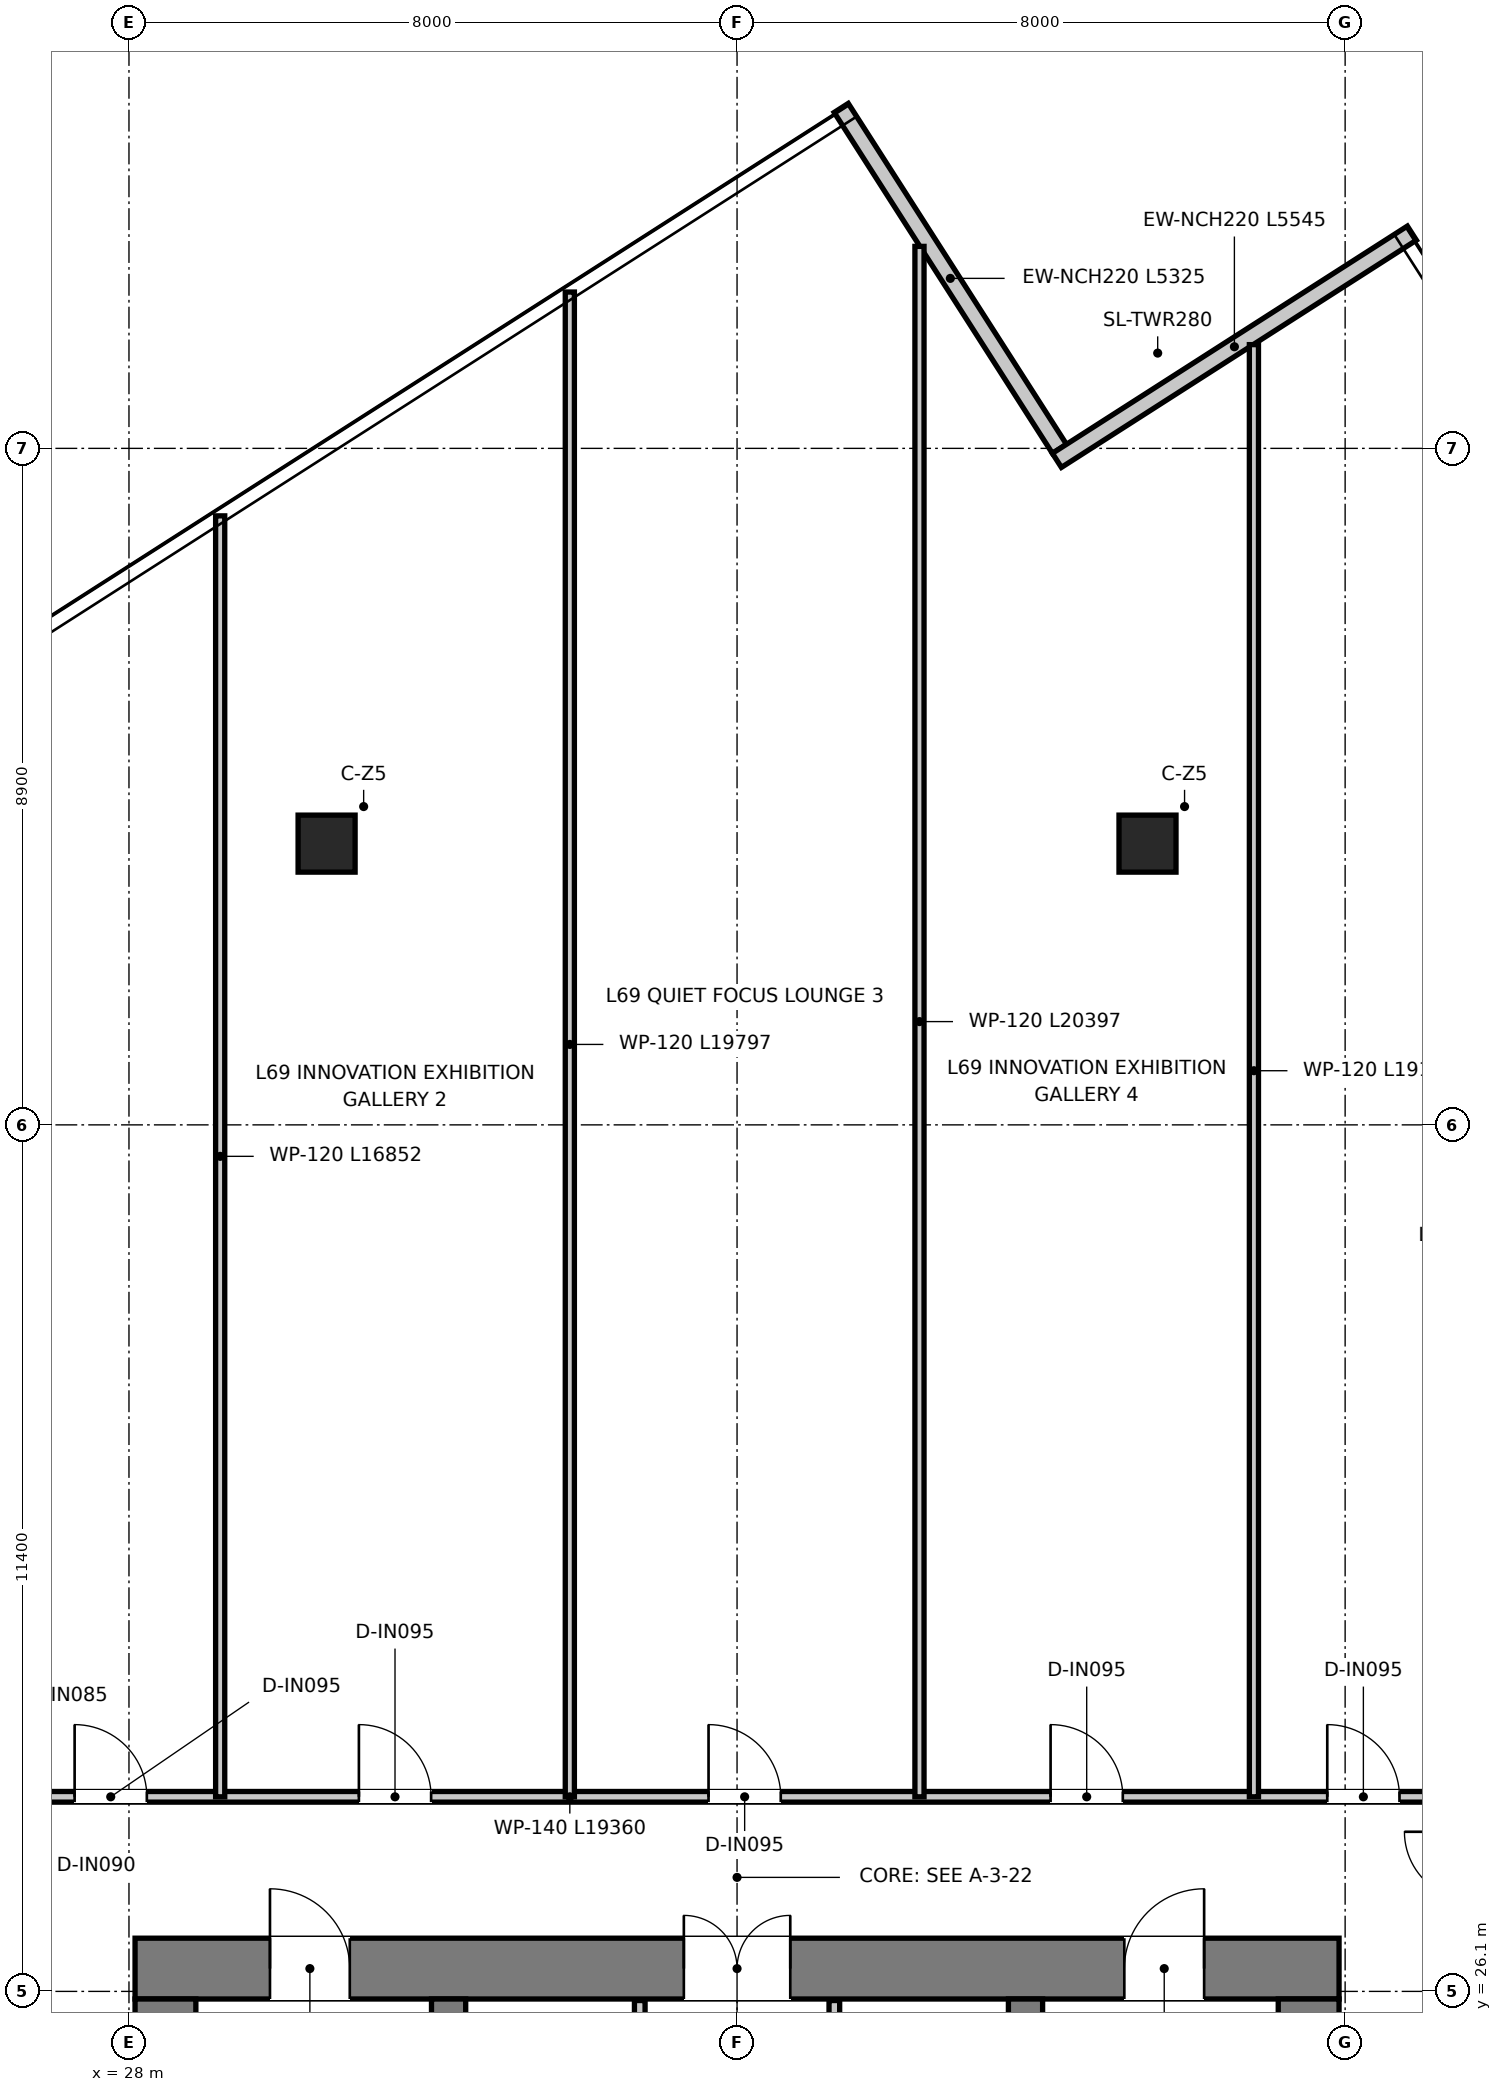
"""IFC4 building model, lengths in metres.
Left out: names, types, materials, properties, quantities, classifications, styles, units other than length and angle.
Written with IfcOpenShell. Run it as: python <this file> out.ifc"""

import sys

from ifc_helpers import new_model, si_unit, direction, frame, frame_2d, origin, origin_2d, place, context, subcontext, project, spatial, rectangle, extrude, source, transform, mapped, element, fill, save


model = new_model("IFC4")
c1 = context("Model", 3, precision=1e-05, world=origin(), true_north=direction((0.0, 1.0)))
c2 = subcontext(c1, "Body", "Model", "MODEL_VIEW")
j1 = project(units=[si_unit("LENGTHUNIT", "METRE"), si_unit("PLANEANGLEUNIT", "RADIAN")], contexts=[c1])
p1 = place(None, origin())
s1 = spatial("IfcSite", under=j1, at=p1, CompositionType="ELEMENT")
p2 = place(p1, origin())
s2 = spatial("IfcBuilding", under=s1, at=p2, CompositionType="ELEMENT")
p3 = place(p2, frame((0.0, 0.0, 283.2)))
s3 = spatial("IfcBuildingStorey", under=s2, at=p3, CompositionType="ELEMENT", Elevation=283.2)
p4 = place(p3, frame((28.08, 26.4, 0.0), z_axis=(0.0, 0.0, 1.0), x_axis=(1.0, 0.0, 0.0)))
e1 = element("IfcWall", 1, at=p4, inside=s3, PredefinedType="SHEAR", context=c2, shape_type="SweptSolid", body=[
    extrude(rectangle(XDim=15.84, YDim=0.8, at=frame_2d((7.92, 0.0))), origin(), (0.0, 0.0, 1.0), 3.95),
])
p5 = place(p4, frame((7.22, 0.0, 0.0)))
e2 = element("IfcOpeningElement", 2, at=p5, cuts=e1, PredefinedType="OPENING", context=c2, shape_type="SweptSolid", body=[
    extrude(rectangle(XDim=1.4, YDim=2.2, at=frame_2d((0.7, 1.1))), frame((0.0, 0.41, 0.0), z_axis=(0.0, -1.0, 0.0), x_axis=(1.0, 0.0, 0.0)), (0.0, 0.0, 1.0), 0.82),
])
p6 = place(p4, frame((1.775, 0.0, 0.0)))
e3 = element("IfcOpeningElement", 3, at=p6, cuts=e1, PredefinedType="OPENING", context=c2, shape_type="SweptSolid", body=[
    extrude(rectangle(XDim=1.05, YDim=2.1, at=frame_2d((0.525, 1.05))), frame((0.0, 0.41, 0.0), z_axis=(0.0, -1.0, 0.0), x_axis=(1.0, 0.0, 0.0)), (0.0, 0.0, 1.0), 0.82),
])
p7 = place(p4, frame((13.015, 0.0, 0.0)))
e4 = element("IfcOpeningElement", 4, at=p7, cuts=e1, PredefinedType="OPENING", context=c2, shape_type="SweptSolid", body=[
    extrude(rectangle(XDim=1.05, YDim=2.1, at=frame_2d((0.525, 1.05))), frame((0.0, 0.41, 0.0), z_axis=(0.0, -1.0, 0.0), x_axis=(1.0, 0.0, 0.0)), (0.0, 0.0, 1.0), 0.82),
])
for number, where, z_axis, x_axis in (
    (5, (28.48, 11.3, 0.0), (0.0, 0.0, 1.0), (0.0, 1.0, 0.0)),
    (6, (43.52, 11.3, 0.0), (0.0, 0.0, 1.0), (0.0, 1.0, 0.0)),
):
    element("IfcWall", number, at=place(p3, frame(where, z_axis=z_axis, x_axis=x_axis)), inside=s3, PredefinedType="SHEAR", context=c2, shape_type="SweptSolid", body=[
        extrude(rectangle(XDim=14.7, YDim=0.8, at=frame_2d((7.35, 0.0))), origin(), (0.0, 0.0, 1.0), 3.95),
    ])
p8 = place(p3, frame((32.205, 13.22, 0.0), z_axis=(0.0, 0.0, 1.0), x_axis=(0.0, 1.0, 0.0)))
e7 = element("IfcWall", 7, at=p8, inside=s3, PredefinedType="SHEAR", context=c2, shape_type="SweptSolid", body=[
    extrude(rectangle(XDim=12.78, YDim=0.45, at=frame_2d((6.39, 0.0))), origin(), (0.0, 0.0, 1.0), 3.95),
])
p9 = place(p8, frame((10.58, 0.0, 0.0)))
e8 = element("IfcOpeningElement", 8, at=p9, cuts=e7, PredefinedType="OPENING", context=c2, shape_type="SweptSolid", body=[
    extrude(rectangle(XDim=1.1, YDim=2.15, at=frame_2d((0.55, 1.075))), frame((0.0, 0.235, 0.0), z_axis=(0.0, -1.0, 0.0), x_axis=(1.0, 0.0, 0.0)), (0.0, 0.0, 1.0), 0.47),
])
p10 = place(p3, frame((39.795, 13.22, 0.0), z_axis=(0.0, 0.0, 1.0), x_axis=(0.0, 1.0, 0.0)))
e9 = element("IfcWall", 9, at=p10, inside=s3, PredefinedType="SHEAR", context=c2, shape_type="SweptSolid", body=[
    extrude(rectangle(XDim=12.78, YDim=0.45, at=frame_2d((6.39, 0.0))), origin(), (0.0, 0.0, 1.0), 3.95),
])
p11 = place(p10, frame((10.58, 0.0, 0.0)))
e10 = element("IfcOpeningElement", 10, at=p11, cuts=e9, PredefinedType="OPENING", context=c2, shape_type="SweptSolid", body=[
    extrude(rectangle(XDim=1.1, YDim=2.15, at=frame_2d((0.55, 1.075))), frame((0.0, 0.235, 0.0), z_axis=(0.0, -1.0, 0.0), x_axis=(1.0, 0.0, 0.0)), (0.0, 0.0, 1.0), 0.47),
])
m1 = source(origin(), c2, "Body", "SweptSolid", [
    extrude(rectangle(XDim=0.75, YDim=0.75, at=origin_2d()), origin(), (0.0, 0.0, 1.0), 3.95),
])
for number, where, z_axis, x_axis in (
    (11, (30.6, 41.2, 0.0), (0.0, 0.0, 1.0), (1.0, 0.0, 0.0)),
    (12, (41.4, 41.2, 0.0), (0.0, 0.0, 1.0), (1.0, 0.0, 0.0)),
):
    element("IfcColumn", number, at=place(p3, frame(where, z_axis=z_axis, x_axis=x_axis)), inside=s3, PredefinedType="COLUMN", context=c2, shape_type="MappedRepresentation", body=[
        mapped(m1, transform((0.0, 0.0, 0.0), x_axis=(1.0, 0.0, 0.0), y_axis=(0.0, 1.0, 0.0), z_axis=(0.0, 0.0, 1.0), scale=1.0)),
    ])
p12 = place(p3, frame((40.241, 46.394, 0.0), z_axis=(0.0, 0.0, 1.0), x_axis=(-0.539157771194, 0.842204783744, 0.0)))
e13 = element("IfcWall", 13, at=p12, inside=s3, PredefinedType="ELEMENTEDWALL", context=c2, shape_type="SweptSolid", body=[
    extrude(rectangle(XDim=5.325, YDim=0.22, at=frame_2d((2.663, 0.0))), origin(), (0.0, 0.0, 1.0), 3.67),
])
p13 = place(p3, frame((44.878, 49.232, 0.0), z_axis=(0.0, 0.0, 1.0), x_axis=(-0.842222620948, -0.539129907131, 0.0)))
e14 = element("IfcWall", 14, at=p13, inside=s3, PredefinedType="ELEMENTEDWALL", context=c2, shape_type="SweptSolid", body=[
    extrude(rectangle(XDim=5.545, YDim=0.22, at=frame_2d((2.772, 0.0))), origin(), (0.0, 0.0, 1.0), 3.67),
])
p14 = place(p3, frame((34.72, 20.2, 0.0), z_axis=(0.0, 0.0, 1.0), x_axis=(0.0, 1.0, 0.0)))
e15 = element("IfcWall", 15, at=p14, inside=s3, PredefinedType="PARTITIONING", context=c2, shape_type="SweptSolid", body=[
    extrude(rectangle(XDim=5.78, YDim=0.14, at=frame_2d((2.89, 0.0))), origin(), (0.0, 0.0, 1.0), 2.82),
])
p15 = place(p14, frame((1.05, 0.0, 0.0)))
e16 = element("IfcOpeningElement", 16, at=p15, cuts=e15, PredefinedType="OPENING", context=c2, shape_type="SweptSolid", body=[
    extrude(rectangle(XDim=0.9, YDim=2.1, at=frame_2d((0.45, 1.05))), frame((0.0, 0.08, 0.0), z_axis=(0.0, -1.0, 0.0), x_axis=(1.0, 0.0, 0.0)), (0.0, 0.0, 1.0), 0.16),
])
p16 = place(p3, frame((37.28, 20.2, 0.0), z_axis=(0.0, 0.0, 1.0), x_axis=(0.0, 1.0, 0.0)))
e17 = element("IfcWall", 17, at=p16, inside=s3, PredefinedType="PARTITIONING", context=c2, shape_type="SweptSolid", body=[
    extrude(rectangle(XDim=5.78, YDim=0.14, at=frame_2d((2.89, 0.0))), origin(), (0.0, 0.0, 1.0), 2.82),
])
p17 = place(p16, frame((0.95, 0.0, 0.0)))
e18 = element("IfcOpeningElement", 18, at=p17, cuts=e17, PredefinedType="OPENING", context=c2, shape_type="SweptSolid", body=[
    extrude(rectangle(XDim=1.1, YDim=2.15, at=frame_2d((0.55, 1.075))), frame((0.0, 0.08, 0.0), z_axis=(0.0, -1.0, 0.0), x_axis=(1.0, 0.0, 0.0)), (0.0, 0.0, 1.0), 0.16),
])
p18 = place(p3, frame((26.32, 28.66, 0.0), z_axis=(0.0, 0.0, 1.0), x_axis=(1.0, 0.0, 0.0)))
e19 = element("IfcWall", 19, at=p18, inside=s3, PredefinedType="PARTITIONING", context=c2, shape_type="SweptSolid", body=[
    extrude(rectangle(XDim=19.36, YDim=0.14, at=frame_2d((9.68, 0.0))), origin(), (0.0, 0.0, 1.0), 3.18),
])
p19 = place(p18, frame((0.965, 0.0, 0.0)))
e20 = element("IfcOpeningElement", 20, at=p19, cuts=e19, PredefinedType="OPENING", context=c2, shape_type="SweptSolid", body=[
    extrude(rectangle(XDim=0.95, YDim=2.1, at=frame_2d((0.475, 1.05))), frame((0.0, 0.08, 0.0), z_axis=(0.0, -1.0, 0.0), x_axis=(1.0, 0.0, 0.0)), (0.0, 0.0, 1.0), 0.16),
])
p20 = place(p18, frame((4.705, 0.0, 0.0)))
e21 = element("IfcOpeningElement", 21, at=p20, cuts=e19, PredefinedType="OPENING", context=c2, shape_type="SweptSolid", body=[
    extrude(rectangle(XDim=0.95, YDim=2.1, at=frame_2d((0.475, 1.05))), frame((0.0, 0.08, 0.0), z_axis=(0.0, -1.0, 0.0), x_axis=(1.0, 0.0, 0.0)), (0.0, 0.0, 1.0), 0.16),
])
p21 = place(p18, frame((9.305, 0.0, 0.0)))
e22 = element("IfcOpeningElement", 22, at=p21, cuts=e19, PredefinedType="OPENING", context=c2, shape_type="SweptSolid", body=[
    extrude(rectangle(XDim=0.95, YDim=2.1, at=frame_2d((0.475, 1.05))), frame((0.0, 0.08, 0.0), z_axis=(0.0, -1.0, 0.0), x_axis=(1.0, 0.0, 0.0)), (0.0, 0.0, 1.0), 0.16),
])
p22 = place(p18, frame((13.805, 0.0, 0.0)))
e23 = element("IfcOpeningElement", 23, at=p22, cuts=e19, PredefinedType="OPENING", context=c2, shape_type="SweptSolid", body=[
    extrude(rectangle(XDim=0.95, YDim=2.1, at=frame_2d((0.475, 1.05))), frame((0.0, 0.08, 0.0), z_axis=(0.0, -1.0, 0.0), x_axis=(1.0, 0.0, 0.0)), (0.0, 0.0, 1.0), 0.16),
])
p23 = place(p18, frame((17.445, 0.0, 0.0)))
e24 = element("IfcOpeningElement", 24, at=p23, cuts=e19, PredefinedType="OPENING", context=c2, shape_type="SweptSolid", body=[
    extrude(rectangle(XDim=0.95, YDim=2.1, at=frame_2d((0.475, 1.05))), frame((0.0, 0.08, 0.0), z_axis=(0.0, -1.0, 0.0), x_axis=(1.0, 0.0, 0.0)), (0.0, 0.0, 1.0), 0.16),
])
p24 = place(p3, frame((29.2, 28.66, 0.0), z_axis=(0.0, 0.0, 1.0), x_axis=(0.0, 1.0, 0.0)))
e25 = element("IfcWall", 25, at=p24, inside=s3, PredefinedType="PARTITIONING", context=c2, shape_type="SweptSolid", body=[
    extrude(rectangle(XDim=16.852, YDim=0.12, at=frame_2d((8.426, 0.0))), origin(), (0.0, 0.0, 1.0), 3.13),
])
p25 = place(p3, frame((33.8, 28.66, 0.0), z_axis=(0.0, 0.0, 1.0), x_axis=(0.0, 1.0, 0.0)))
e26 = element("IfcWall", 26, at=p25, inside=s3, PredefinedType="PARTITIONING", context=c2, shape_type="SweptSolid", body=[
    extrude(rectangle(XDim=19.797, YDim=0.12, at=frame_2d((9.898, 0.0))), origin(), (0.0, 0.0, 1.0), 3.13),
])
p26 = place(p3, frame((38.4, 28.66, 0.0), z_axis=(0.0, 0.0, 1.0), x_axis=(0.0, 1.0, 0.0)))
e27 = element("IfcWall", 27, at=p26, inside=s3, PredefinedType="PARTITIONING", context=c2, shape_type="SweptSolid", body=[
    extrude(rectangle(XDim=20.397, YDim=0.12, at=frame_2d((10.199, 0.0))), origin(), (0.0, 0.0, 1.0), 3.13),
])
p27 = place(p3, frame((42.8, 28.66, 0.0), z_axis=(0.0, 0.0, 1.0), x_axis=(0.0, 1.0, 0.0)))
e28 = element("IfcWall", 28, at=p27, inside=s3, PredefinedType="PARTITIONING", context=c2, shape_type="SweptSolid", body=[
    extrude(rectangle(XDim=19.105, YDim=0.12, at=frame_2d((9.552, 0.0))), origin(), (0.0, 0.0, 1.0), 3.13),
])
p28 = place(p5, origin())
e29 = element("IfcDoor", 29, at=p28, inside=s3, OperationType="DOUBLE_DOOR_SINGLE_SWING", PredefinedType="DOOR", context=c2, shape_type="SweptSolid", body=[
    extrude(rectangle(XDim=1.4, YDim=2.2, at=frame_2d((0.7, 1.1))), frame((0.0, 0.025, 0.0), z_axis=(0.0, -1.0, 0.0), x_axis=(1.0, 0.0, 0.0)), (0.0, 0.0, 1.0), 0.05),
])
fill(e2, e29)
p29 = place(p6, origin())
e30 = element("IfcDoor", 30, at=p29, inside=s3, OperationType="SINGLE_SWING_LEFT", PredefinedType="DOOR", context=c2, shape_type="SweptSolid", body=[
    extrude(rectangle(XDim=1.05, YDim=2.1, at=frame_2d((0.525, 1.05))), frame((0.0, 0.025, 0.0), z_axis=(0.0, -1.0, 0.0), x_axis=(1.0, 0.0, 0.0)), (0.0, 0.0, 1.0), 0.05),
])
fill(e3, e30)
p30 = place(p7, origin())
e31 = element("IfcDoor", 31, at=p30, inside=s3, OperationType="SINGLE_SWING_RIGHT", PredefinedType="DOOR", context=c2, shape_type="SweptSolid", body=[
    extrude(rectangle(XDim=1.05, YDim=2.1, at=frame_2d((0.525, 1.05))), frame((0.0, 0.025, 0.0), z_axis=(0.0, -1.0, 0.0), x_axis=(1.0, 0.0, 0.0)), (0.0, 0.0, 1.0), 0.05),
])
fill(e4, e31)
p31 = place(p19, origin())
e32 = element("IfcDoor", 32, at=p31, inside=s3, OperationType="SINGLE_SWING_LEFT", PredefinedType="DOOR", context=c2, shape_type="SweptSolid", body=[
    extrude(rectangle(XDim=0.95, YDim=2.1, at=frame_2d((0.475, 1.05))), frame((0.0, 0.025, 0.0), z_axis=(0.0, -1.0, 0.0), x_axis=(1.0, 0.0, 0.0)), (0.0, 0.0, 1.0), 0.05),
])
fill(e20, e32)
p32 = place(p20, origin())
e33 = element("IfcDoor", 33, at=p32, inside=s3, OperationType="SINGLE_SWING_LEFT", PredefinedType="DOOR", context=c2, shape_type="SweptSolid", body=[
    extrude(rectangle(XDim=0.95, YDim=2.1, at=frame_2d((0.475, 1.05))), frame((0.0, 0.025, 0.0), z_axis=(0.0, -1.0, 0.0), x_axis=(1.0, 0.0, 0.0)), (0.0, 0.0, 1.0), 0.05),
])
fill(e21, e33)
p33 = place(p21, origin())
e34 = element("IfcDoor", 34, at=p33, inside=s3, OperationType="SINGLE_SWING_LEFT", PredefinedType="DOOR", context=c2, shape_type="SweptSolid", body=[
    extrude(rectangle(XDim=0.95, YDim=2.1, at=frame_2d((0.475, 1.05))), frame((0.0, 0.025, 0.0), z_axis=(0.0, -1.0, 0.0), x_axis=(1.0, 0.0, 0.0)), (0.0, 0.0, 1.0), 0.05),
])
fill(e22, e34)
p34 = place(p22, origin())
e35 = element("IfcDoor", 35, at=p34, inside=s3, OperationType="SINGLE_SWING_LEFT", PredefinedType="DOOR", context=c2, shape_type="SweptSolid", body=[
    extrude(rectangle(XDim=0.95, YDim=2.1, at=frame_2d((0.475, 1.05))), frame((0.0, 0.025, 0.0), z_axis=(0.0, -1.0, 0.0), x_axis=(1.0, 0.0, 0.0)), (0.0, 0.0, 1.0), 0.05),
])
fill(e23, e35)
p35 = place(p23, origin())
e36 = element("IfcDoor", 36, at=p35, inside=s3, OperationType="SINGLE_SWING_LEFT", PredefinedType="DOOR", context=c2, shape_type="SweptSolid", body=[
    extrude(rectangle(XDim=0.95, YDim=2.1, at=frame_2d((0.475, 1.05))), frame((0.0, 0.025, 0.0), z_axis=(0.0, -1.0, 0.0), x_axis=(1.0, 0.0, 0.0)), (0.0, 0.0, 1.0), 0.05),
])
fill(e24, e36)
save(model, sys.argv[1])
